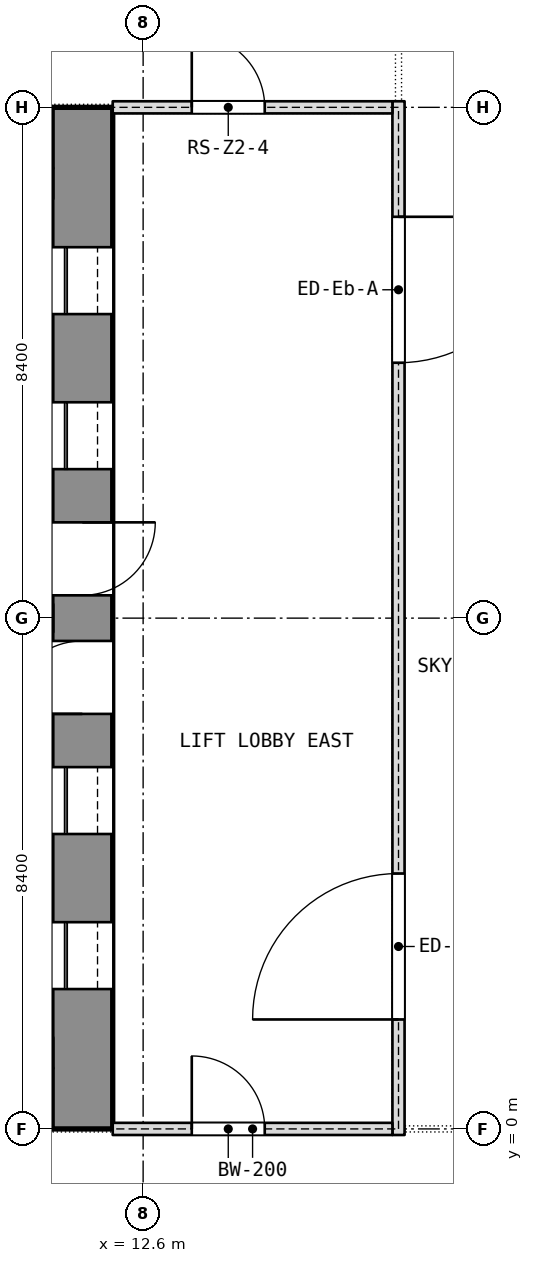
"""IFC4 building model, lengths in metres.
Left out: names, types, materials, properties, quantities, classifications, styles, units other than length and angle.
Written with IfcOpenShell. Run it as: python <this file> out.ifc"""

import sys

from ifc_helpers import new_model, si_unit, direction, frame, frame_2d, origin, place, context, subcontext, project, spatial, rectangle, extrude, element, fill, save


model = new_model("IFC4")
c1 = context("Model", 3, precision=1e-05, world=origin(), true_north=direction((0.0, 1.0)))
c2 = subcontext(c1, "Body", "Model", "MODEL_VIEW")
j1 = project(units=[si_unit("LENGTHUNIT", "METRE"), si_unit("PLANEANGLEUNIT", "RADIAN")], contexts=[c1])
p1 = place(None, origin())
s1 = spatial("IfcSite", under=j1, at=p1, CompositionType="ELEMENT")
p2 = place(p1, origin())
s2 = spatial("IfcBuilding", under=s1, at=p2, CompositionType="ELEMENT")
p3 = place(p2, frame((0.0, 0.0, 97.7)))
s3 = spatial("IfcBuildingStorey", under=s2, at=p3, CompositionType="ELEMENT", Elevation=97.7)
p4 = place(p3, frame((11.6, 0.0, 0.0), z_axis=(0.0, 0.0, 1.0), x_axis=(0.0, 1.0, 0.0)))
e1 = element("IfcWall", 1, at=p4, inside=s3, PredefinedType="SHEAR", context=c2, shape_type="SweptSolid", body=[
    extrude(rectangle(XDim=16.8, YDim=1.0, at=frame_2d((8.4, 0.0))), origin(), (0.0, 0.0, 1.0), 7.2),
])
p5 = place(p4, frame((2.3, 0.0, 0.0)))
e2 = element("IfcOpeningElement", 2, at=p5, cuts=e1, PredefinedType="OPENING", context=c2, shape_type="SweptSolid", body=[
    extrude(rectangle(XDim=1.1, YDim=2.1, at=frame_2d((0.55, 1.05))), frame((0.0, 0.5, 0.0), z_axis=(0.0, -1.0, 0.0), x_axis=(1.0, 0.0, 0.0)), (0.0, 0.0, 1.0), 1.0),
])
p6 = place(p4, frame((4.85, 0.0, 0.0)))
e3 = element("IfcOpeningElement", 3, at=p6, cuts=e1, PredefinedType="OPENING", context=c2, shape_type="SweptSolid", body=[
    extrude(rectangle(XDim=1.1, YDim=2.1, at=frame_2d((0.55, 1.05))), frame((0.0, 0.5, 0.0), z_axis=(0.0, -1.0, 0.0), x_axis=(1.0, 0.0, 0.0)), (0.0, 0.0, 1.0), 1.0),
])
p7 = place(p4, frame((6.825, 0.0, 0.0)))
e4 = element("IfcOpeningElement", 4, at=p7, cuts=e1, PredefinedType="OPENING", context=c2, shape_type="SweptSolid", body=[
    extrude(rectangle(XDim=1.2, YDim=2.1, at=frame_2d((0.6, 1.05))), frame((0.0, 0.5, 0.0), z_axis=(0.0, -1.0, 0.0), x_axis=(1.0, 0.0, 0.0)), (0.0, 0.0, 1.0), 1.0),
])
p8 = place(p4, frame((13.4, 0.0, 0.0)))
e5 = element("IfcOpeningElement", 5, at=p8, cuts=e1, PredefinedType="OPENING", context=c2, shape_type="SweptSolid", body=[
    extrude(rectangle(XDim=1.1, YDim=2.1, at=frame_2d((0.55, 1.05))), frame((0.0, 0.5, 0.0), z_axis=(0.0, -1.0, 0.0), x_axis=(1.0, 0.0, 0.0)), (0.0, 0.0, 1.0), 1.0),
])
p9 = place(p4, frame((10.85, 0.0, 0.0)))
e6 = element("IfcOpeningElement", 6, at=p9, cuts=e1, PredefinedType="OPENING", context=c2, shape_type="SweptSolid", body=[
    extrude(rectangle(XDim=1.1, YDim=2.1, at=frame_2d((0.55, 1.05))), frame((0.0, 0.5, 0.0), z_axis=(0.0, -1.0, 0.0), x_axis=(1.0, 0.0, 0.0)), (0.0, 0.0, 1.0), 1.0),
])
p10 = place(p4, frame((8.775, 0.0, 0.0)))
e7 = element("IfcOpeningElement", 7, at=p10, cuts=e1, PredefinedType="OPENING", context=c2, shape_type="SweptSolid", body=[
    extrude(rectangle(XDim=1.2, YDim=2.1, at=frame_2d((0.6, 1.05))), frame((0.0, 0.5, 0.0), z_axis=(0.0, -1.0, 0.0), x_axis=(1.0, 0.0, 0.0)), (0.0, 0.0, 1.0), 1.0),
])
p11 = place(p3, frame((16.8, -0.1, 0.0), z_axis=(0.0, 0.0, 1.0), x_axis=(0.0, 1.0, 0.0)))
e8 = element("IfcWall", 8, at=p11, inside=s3, PredefinedType="PARTITIONING", context=c2, shape_type="SweptSolid", body=[
    extrude(rectangle(XDim=17.0, YDim=0.2, at=frame_2d((8.5, 0.0))), origin(), (0.0, 0.0, 1.0), 6.94),
])
p12 = place(p11, frame((1.9, 0.0, 0.0)))
e9 = element("IfcOpeningElement", 9, at=p12, cuts=e8, PredefinedType="OPENING", context=c2, shape_type="SweptSolid", body=[
    extrude(rectangle(XDim=2.4, YDim=2.1, at=frame_2d((1.2, 1.05))), frame((0.0, 0.1, 0.0), z_axis=(0.0, -1.0, 0.0), x_axis=(1.0, 0.0, 0.0)), (0.0, 0.0, 1.0), 0.2),
])
p13 = place(p11, frame((12.7, 0.0, 0.0)))
e10 = element("IfcOpeningElement", 10, at=p13, cuts=e8, PredefinedType="OPENING", context=c2, shape_type="SweptSolid", body=[
    extrude(rectangle(XDim=2.4, YDim=2.1, at=frame_2d((1.2, 1.05))), frame((0.0, 0.1, 0.0), z_axis=(0.0, -1.0, 0.0), x_axis=(1.0, 0.0, 0.0)), (0.0, 0.0, 1.0), 0.2),
])
p14 = place(p3, frame((12.1, 0.0, 0.0), z_axis=(0.0, 0.0, 1.0), x_axis=(1.0, 0.0, 0.0)))
e11 = element("IfcWall", 11, at=p14, inside=s3, PredefinedType="PARTITIONING", context=c2, shape_type="SweptSolid", body=[
    extrude(rectangle(XDim=4.6, YDim=0.2, at=frame_2d((2.3, 0.0))), origin(), (0.0, 0.0, 1.0), 6.49),
])
p15 = place(p14, frame((1.3, 0.0, 0.0)))
e12 = element("IfcOpeningElement", 12, at=p15, cuts=e11, PredefinedType="OPENING", context=c2, shape_type="SweptSolid", body=[
    extrude(rectangle(XDim=1.2, YDim=2.1, at=frame_2d((0.6, 1.05))), frame((0.0, 0.1, 0.0), z_axis=(0.0, -1.0, 0.0), x_axis=(1.0, 0.0, 0.0)), (0.0, 0.0, 1.0), 0.2),
])
p16 = place(p3, frame((12.1, 16.8, 0.0), z_axis=(0.0, 0.0, 1.0), x_axis=(1.0, 0.0, 0.0)))
e13 = element("IfcWall", 13, at=p16, inside=s3, PredefinedType="PARTITIONING", context=c2, shape_type="SweptSolid", body=[
    extrude(rectangle(XDim=4.6, YDim=0.2, at=frame_2d((2.3, 0.0))), origin(), (0.0, 0.0, 1.0), 6.49),
])
p17 = place(p16, frame((1.3, 0.0, 0.0)))
e14 = element("IfcOpeningElement", 14, at=p17, cuts=e13, PredefinedType="OPENING", context=c2, shape_type="SweptSolid", body=[
    extrude(rectangle(XDim=1.2, YDim=2.1, at=frame_2d((0.6, 1.05))), frame((0.0, 0.1, 0.0), z_axis=(0.0, -1.0, 0.0), x_axis=(1.0, 0.0, 0.0)), (0.0, 0.0, 1.0), 0.2),
])
p18 = place(p5, origin())
e15 = element("IfcDoor", 15, at=p18, inside=s3, OperationType="SLIDING_TO_LEFT", PredefinedType="DOOR", context=c2, shape_type="SweptSolid", body=[
    extrude(rectangle(XDim=1.1, YDim=2.1, at=frame_2d((0.55, 1.05))), frame((0.0, 0.025, 0.0), z_axis=(0.0, -1.0, 0.0), x_axis=(1.0, 0.0, 0.0)), (0.0, 0.0, 1.0), 0.05),
])
fill(e2, e15)
p19 = place(p6, origin())
e16 = element("IfcDoor", 16, at=p19, inside=s3, OperationType="SLIDING_TO_LEFT", PredefinedType="DOOR", context=c2, shape_type="SweptSolid", body=[
    extrude(rectangle(XDim=1.1, YDim=2.1, at=frame_2d((0.55, 1.05))), frame((0.0, 0.025, 0.0), z_axis=(0.0, -1.0, 0.0), x_axis=(1.0, 0.0, 0.0)), (0.0, 0.0, 1.0), 0.05),
])
fill(e3, e16)
p20 = place(p7, origin())
e17 = element("IfcDoor", 17, at=p20, inside=s3, OperationType="SINGLE_SWING_LEFT", PredefinedType="DOOR", context=c2, shape_type="SweptSolid", body=[
    extrude(rectangle(XDim=1.2, YDim=2.1, at=frame_2d((0.6, 1.05))), frame((0.0, 0.025, 0.0), z_axis=(0.0, -1.0, 0.0), x_axis=(1.0, 0.0, 0.0)), (0.0, 0.0, 1.0), 0.05),
])
fill(e4, e17)
p21 = place(p8, origin())
e18 = element("IfcDoor", 18, at=p21, inside=s3, OperationType="SLIDING_TO_LEFT", PredefinedType="DOOR", context=c2, shape_type="SweptSolid", body=[
    extrude(rectangle(XDim=1.1, YDim=2.1, at=frame_2d((0.55, 1.05))), frame((0.0, 0.025, 0.0), z_axis=(0.0, -1.0, 0.0), x_axis=(1.0, 0.0, 0.0)), (0.0, 0.0, 1.0), 0.05),
])
fill(e5, e18)
p22 = place(p9, origin())
e19 = element("IfcDoor", 19, at=p22, inside=s3, OperationType="SLIDING_TO_LEFT", PredefinedType="DOOR", context=c2, shape_type="SweptSolid", body=[
    extrude(rectangle(XDim=1.1, YDim=2.1, at=frame_2d((0.55, 1.05))), frame((0.0, 0.025, 0.0), z_axis=(0.0, -1.0, 0.0), x_axis=(1.0, 0.0, 0.0)), (0.0, 0.0, 1.0), 0.05),
])
fill(e6, e19)
p23 = place(p10, origin())
e20 = element("IfcDoor", 20, at=p23, inside=s3, OperationType="SINGLE_SWING_LEFT", PredefinedType="DOOR", context=c2, shape_type="SweptSolid", body=[
    extrude(rectangle(XDim=1.2, YDim=2.1, at=frame_2d((0.6, 1.05))), frame((0.0, 0.025, 0.0), z_axis=(0.0, -1.0, 0.0), x_axis=(1.0, 0.0, 0.0)), (0.0, 0.0, 1.0), 0.05),
])
fill(e7, e20)
p24 = place(p12, origin())
e21 = element("IfcDoor", 21, at=p24, inside=s3, OperationType="DOUBLE_DOOR_SINGLE_SWING", PredefinedType="DOOR", context=c2, shape_type="SweptSolid", body=[
    extrude(rectangle(XDim=2.4, YDim=2.1, at=frame_2d((1.2, 1.05))), frame((0.0, 0.025, 0.0), z_axis=(0.0, -1.0, 0.0), x_axis=(1.0, 0.0, 0.0)), (0.0, 0.0, 1.0), 0.05),
])
fill(e9, e21)
p25 = place(p13, origin())
e22 = element("IfcDoor", 22, at=p25, inside=s3, OperationType="DOUBLE_DOOR_SINGLE_SWING", PredefinedType="DOOR", context=c2, shape_type="SweptSolid", body=[
    extrude(rectangle(XDim=2.4, YDim=2.1, at=frame_2d((1.2, 1.05))), frame((0.0, 0.025, 0.0), z_axis=(0.0, -1.0, 0.0), x_axis=(1.0, 0.0, 0.0)), (0.0, 0.0, 1.0), 0.05),
])
fill(e10, e22)
p26 = place(p15, origin())
e23 = element("IfcDoor", 23, at=p26, inside=s3, OperationType="SINGLE_SWING_LEFT", PredefinedType="DOOR", context=c2, shape_type="SweptSolid", body=[
    extrude(rectangle(XDim=1.2, YDim=2.1, at=frame_2d((0.6, 1.05))), frame((0.0, 0.025, 0.0), z_axis=(0.0, -1.0, 0.0), x_axis=(1.0, 0.0, 0.0)), (0.0, 0.0, 1.0), 0.05),
])
fill(e12, e23)
p27 = place(p17, origin())
e24 = element("IfcDoor", 24, at=p27, inside=s3, OperationType="SINGLE_SWING_LEFT", PredefinedType="DOOR", context=c2, shape_type="SweptSolid", body=[
    extrude(rectangle(XDim=1.2, YDim=2.1, at=frame_2d((0.6, 1.05))), frame((0.0, 0.025, 0.0), z_axis=(0.0, -1.0, 0.0), x_axis=(1.0, 0.0, 0.0)), (0.0, 0.0, 1.0), 0.05),
])
fill(e14, e24)
save(model, sys.argv[1])
